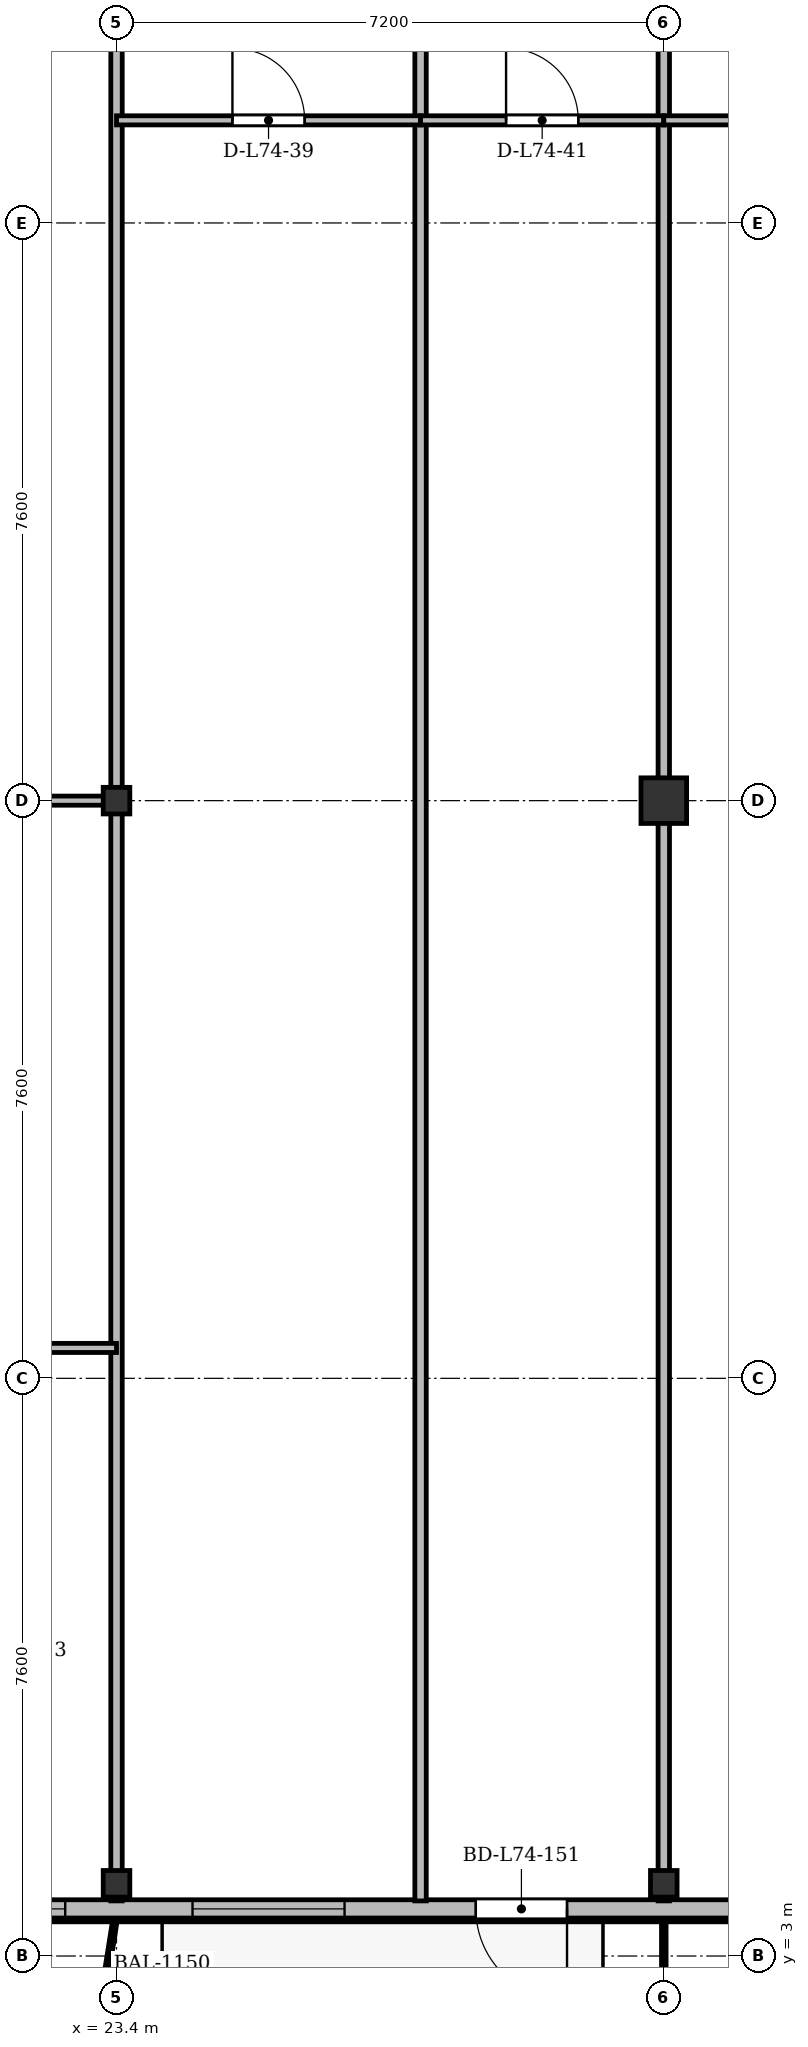
"""IFC4 building model, lengths in metres.
Left out: names, types, materials, properties, quantities, classifications, styles, units other than length and angle.
Written with IfcOpenShell. Run it as: python <this file> out.ifc"""

import sys

from ifc_helpers import new_model, si_unit, direction, frame, frame_2d, origin, origin_2d, place, context, subcontext, project, spatial, rectangle, i_section, extrude, source, transform, mapped, element, fill, save


model = new_model("IFC4")
c1 = context("Model", 3, precision=1e-05, world=origin(), true_north=direction((0.0, 1.0)))
c2 = subcontext(c1, "Body", "Model", "MODEL_VIEW")
j1 = project(units=[si_unit("LENGTHUNIT", "METRE"), si_unit("PLANEANGLEUNIT", "RADIAN")], contexts=[c1])
p1 = place(None, origin())
s1 = spatial("IfcSite", under=j1, at=p1, CompositionType="ELEMENT")
p2 = place(p1, origin())
s2 = spatial("IfcBuilding", under=s1, at=p2, CompositionType="ELEMENT")
p3 = place(p2, frame((0.0, 0.0, 284.7)))
s3 = spatial("IfcBuildingStorey", under=s2, at=p3, CompositionType="ELEMENT", Elevation=284.7)
m1 = source(origin(), c2, "Body", "SweptSolid", [
    extrude(i_section(OverallWidth=0.35, OverallDepth=0.35, WebThickness=0.018, FlangeThickness=0.028, at=origin_2d()), origin(), (0.0, 0.0, 1.0), 3.6),
])
for number, where, z_axis, x_axis in (
    (1, (23.4, 3.95, 0.0), (0.0, 0.0, 1.0), (1.0, 0.0, 0.0)),
    (2, (23.4, 18.2, 0.0), (0.0, 0.0, 1.0), (1.0, 0.0, 0.0)),
    (3, (30.6, 3.95, 0.0), (0.0, 0.0, 1.0), (1.0, 0.0, 0.0)),
):
    element("IfcColumn", number, at=place(p3, frame(where, z_axis=z_axis, x_axis=x_axis)), inside=s3, PredefinedType="COLUMN", context=c2, shape_type="MappedRepresentation", body=[
        mapped(m1, transform((0.0, 0.0, 0.0), x_axis=(1.0, 0.0, 0.0), y_axis=(0.0, 1.0, 0.0), z_axis=(0.0, 0.0, 1.0), scale=1.0)),
    ])
m2 = source(origin(), c2, "Body", "SweptSolid", [
    extrude(rectangle(XDim=0.6, YDim=0.6, at=origin_2d()), origin(), (0.0, 0.0, 1.0), 3.6),
])
p4 = place(p3, frame((30.6, 18.2, 0.0), z_axis=(0.0, 0.0, 1.0), x_axis=(1.0, 0.0, 0.0)))
e4 = element("IfcColumn", 4, at=p4, inside=s3, PredefinedType="COLUMN", context=c2, shape_type="MappedRepresentation", body=[
    mapped(m2, transform((0.0, 0.0, 0.0), x_axis=(1.0, 0.0, 0.0), y_axis=(0.0, 1.0, 0.0), z_axis=(0.0, 0.0, 1.0), scale=1.0)),
])
p5 = place(p3, frame((63.2, 3.62, 0.0), z_axis=(0.0, 0.0, 1.0), x_axis=(-1.0, 0.0, 0.0)))
e5 = element("IfcWall", 5, at=p5, inside=s3, PredefinedType="SOLIDWALL", context=c2, shape_type="SweptSolid", body=[
    extrude(rectangle(XDim=52.0, YDim=0.24, at=frame_2d((26.0, 0.0))), origin(), (0.0, 0.0, 1.0), 3.37),
])
p6 = place(p5, frame((0.92, 0.0, 0.9)))
e6 = element("IfcOpeningElement", 6, at=p6, cuts=e5, PredefinedType="OPENING", context=c2, shape_type="SweptSolid", body=[
    extrude(rectangle(XDim=1.65, YDim=1.85, at=frame_2d((0.825, 0.925))), frame((0.0, 0.13, 0.0), z_axis=(0.0, -1.0, 0.0), x_axis=(1.0, 0.0, 0.0)), (0.0, 0.0, 1.0), 0.26),
])
p7 = place(p5, frame((4.793, 0.0, 0.9)))
e7 = element("IfcOpeningElement", 7, at=p7, cuts=e5, PredefinedType="OPENING", context=c2, shape_type="SweptSolid", body=[
    extrude(rectangle(XDim=1.35, YDim=1.5, at=frame_2d((0.675, 0.75))), frame((0.0, 0.13, 0.0), z_axis=(0.0, -1.0, 0.0), x_axis=(1.0, 0.0, 0.0)), (0.0, 0.0, 1.0), 0.26),
])
p8 = place(p5, frame((6.685, 0.0, 0.0)))
e8 = element("IfcOpeningElement", 8, at=p8, cuts=e5, PredefinedType="OPENING", context=c2, shape_type="SweptSolid", body=[
    extrude(rectangle(XDim=1.2, YDim=2.2, at=frame_2d((0.6, 1.1))), frame((0.0, 0.13, 0.0), z_axis=(0.0, -1.0, 0.0), x_axis=(1.0, 0.0, 0.0)), (0.0, 0.0, 1.0), 0.26),
])
p9 = place(p5, frame((9.983, 0.0, 0.9)))
e9 = element("IfcOpeningElement", 9, at=p9, cuts=e5, PredefinedType="OPENING", context=c2, shape_type="SweptSolid", body=[
    extrude(rectangle(XDim=1.5, YDim=1.75, at=frame_2d((0.75, 0.875))), frame((0.0, 0.13, 0.0), z_axis=(0.0, -1.0, 0.0), x_axis=(1.0, 0.0, 0.0)), (0.0, 0.0, 1.0), 0.26),
])
p10 = place(p5, frame((13.2, 0.0, 0.9)))
e10 = element("IfcOpeningElement", 10, at=p10, cuts=e5, PredefinedType="OPENING", context=c2, shape_type="SweptSolid", body=[
    extrude(rectangle(XDim=2.0, YDim=1.95, at=frame_2d((1.0, 0.975))), frame((0.0, 0.13, 0.0), z_axis=(0.0, -1.0, 0.0), x_axis=(1.0, 0.0, 0.0)), (0.0, 0.0, 1.0), 0.26),
])
p11 = place(p5, frame((16.975, 0.0, 0.9)))
e11 = element("IfcOpeningElement", 11, at=p11, cuts=e5, PredefinedType="OPENING", context=c2, shape_type="SweptSolid", body=[
    extrude(rectangle(XDim=1.65, YDim=1.85, at=frame_2d((0.825, 0.925))), frame((0.0, 0.13, 0.0), z_axis=(0.0, -1.0, 0.0), x_axis=(1.0, 0.0, 0.0)), (0.0, 0.0, 1.0), 0.26),
])
p12 = place(p5, frame((21.3, 0.0, 0.9)))
e12 = element("IfcOpeningElement", 12, at=p12, cuts=e5, PredefinedType="OPENING", context=c2, shape_type="SweptSolid", body=[
    extrude(rectangle(XDim=1.8, YDim=1.8, at=frame_2d((0.9, 0.9))), frame((0.0, 0.13, 0.0), z_axis=(0.0, -1.0, 0.0), x_axis=(1.0, 0.0, 0.0)), (0.0, 0.0, 1.0), 0.26),
])
p13 = place(p5, frame((27.7, 0.0, 0.9)))
e13 = element("IfcOpeningElement", 13, at=p13, cuts=e5, PredefinedType="OPENING", context=c2, shape_type="SweptSolid", body=[
    extrude(rectangle(XDim=2.2, YDim=1.8, at=frame_2d((1.1, 0.9))), frame((0.0, 0.13, 0.0), z_axis=(0.0, -1.0, 0.0), x_axis=(1.0, 0.0, 0.0)), (0.0, 0.0, 1.0), 0.26),
])
p14 = place(p5, frame((33.873, 0.0, 0.0)))
e14 = element("IfcOpeningElement", 14, at=p14, cuts=e5, PredefinedType="OPENING", context=c2, shape_type="SweptSolid", body=[
    extrude(rectangle(XDim=1.2, YDim=2.2, at=frame_2d((0.6, 1.1))), frame((0.0, 0.13, 0.0), z_axis=(0.0, -1.0, 0.0), x_axis=(1.0, 0.0, 0.0)), (0.0, 0.0, 1.0), 0.26),
])
p15 = place(p5, frame((36.8, 0.0, 0.9)))
e15 = element("IfcOpeningElement", 15, at=p15, cuts=e5, PredefinedType="OPENING", context=c2, shape_type="SweptSolid", body=[
    extrude(rectangle(XDim=2.0, YDim=1.95, at=frame_2d((1.0, 0.975))), frame((0.0, 0.13, 0.0), z_axis=(0.0, -1.0, 0.0), x_axis=(1.0, 0.0, 0.0)), (0.0, 0.0, 1.0), 0.26),
])
p16 = place(p5, frame((40.475, 0.0, 0.9)))
e16 = element("IfcOpeningElement", 16, at=p16, cuts=e5, PredefinedType="OPENING", context=c2, shape_type="SweptSolid", body=[
    extrude(rectangle(XDim=1.65, YDim=1.85, at=frame_2d((0.825, 0.925))), frame((0.0, 0.13, 0.0), z_axis=(0.0, -1.0, 0.0), x_axis=(1.0, 0.0, 0.0)), (0.0, 0.0, 1.0), 0.26),
])
p17 = place(p5, frame((43.4, 0.0, 0.9)))
e17 = element("IfcOpeningElement", 17, at=p17, cuts=e5, PredefinedType="OPENING", context=c2, shape_type="SweptSolid", body=[
    extrude(rectangle(XDim=1.8, YDim=1.8, at=frame_2d((0.9, 0.9))), frame((0.0, 0.13, 0.0), z_axis=(0.0, -1.0, 0.0), x_axis=(1.0, 0.0, 0.0)), (0.0, 0.0, 1.0), 0.26),
])
p18 = place(p5, frame((45.99, 0.0, 0.9)))
e18 = element("IfcOpeningElement", 18, at=p18, cuts=e5, PredefinedType="OPENING", context=c2, shape_type="SweptSolid", body=[
    extrude(rectangle(XDim=1.2, YDim=1.65, at=frame_2d((0.6, 0.825))), frame((0.0, 0.13, 0.0), z_axis=(0.0, -1.0, 0.0), x_axis=(1.0, 0.0, 0.0)), (0.0, 0.0, 1.0), 0.26),
])
p19 = place(p5, frame((49.605, 0.0, 0.9)))
e19 = element("IfcOpeningElement", 19, at=p19, cuts=e5, PredefinedType="OPENING", context=c2, shape_type="SweptSolid", body=[
    extrude(rectangle(XDim=1.5, YDim=1.75, at=frame_2d((0.75, 0.875))), frame((0.0, 0.13, 0.0), z_axis=(0.0, -1.0, 0.0), x_axis=(1.0, 0.0, 0.0)), (0.0, 0.0, 1.0), 0.26),
])
p20 = place(p3, frame((23.4, 3.725, 0.0), z_axis=(0.0, 0.0, 1.0), x_axis=(0.0, 1.0, 0.0)))
e20 = element("IfcWall", 20, at=p20, inside=s3, PredefinedType="PARTITIONING", context=c2, shape_type="SweptSolid", body=[
    extrude(rectangle(XDim=27.275, YDim=0.15, at=frame_2d((13.637, 0.0))), origin(), (0.0, 0.0, 1.0), 2.87),
])
p21 = place(p3, frame((27.4, 3.725, 0.0), z_axis=(0.0, 0.0, 1.0), x_axis=(0.0, 1.0, 0.0)))
e21 = element("IfcWall", 21, at=p21, inside=s3, PredefinedType="PARTITIONING", context=c2, shape_type="SweptSolid", body=[
    extrude(rectangle(XDim=27.275, YDim=0.15, at=frame_2d((13.637, 0.0))), origin(), (0.0, 0.0, 1.0), 2.92),
])
p22 = place(p3, frame((30.6, 3.725, 0.0), z_axis=(0.0, 0.0, 1.0), x_axis=(0.0, 1.0, 0.0)))
e22 = element("IfcWall", 22, at=p22, inside=s3, PredefinedType="PARTITIONING", context=c2, shape_type="SweptSolid", body=[
    extrude(rectangle(XDim=27.275, YDim=0.15, at=frame_2d((13.637, 0.0))), origin(), (0.0, 0.0, 1.0), 2.87),
])
p23 = place(p3, frame((14.4, 18.2, 0.0), z_axis=(0.0, 0.0, 1.0), x_axis=(1.0, 0.0, 0.0)))
e23 = element("IfcWall", 23, at=p23, inside=s3, PredefinedType="PARTITIONING", context=c2, shape_type="SweptSolid", body=[
    extrude(rectangle(XDim=9.0, YDim=0.12, at=frame_2d((4.5, 0.0))), origin(), (0.0, 0.0, 1.0), 2.92),
])
p24 = place(p23, frame((4.025, 0.0, 0.0)))
e24 = element("IfcOpeningElement", 24, at=p24, cuts=e23, PredefinedType="OPENING", context=c2, shape_type="SweptSolid", body=[
    extrude(rectangle(XDim=0.95, YDim=2.15, at=frame_2d((0.475, 1.075))), frame((0.0, 0.07, 0.0), z_axis=(0.0, -1.0, 0.0), x_axis=(1.0, 0.0, 0.0)), (0.0, 0.0, 1.0), 0.14),
])
p25 = place(p3, frame((20.4, 11.0, 0.0), z_axis=(0.0, 0.0, 1.0), x_axis=(1.0, 0.0, 0.0)))
e25 = element("IfcWall", 25, at=p25, inside=s3, PredefinedType="PARTITIONING", context=c2, shape_type="SweptSolid", body=[
    extrude(rectangle(XDim=3.0, YDim=0.12, at=frame_2d((1.5, 0.0))), origin(), (0.0, 0.0, 1.0), 2.87),
])
p26 = place(p25, frame((1.025, 0.0, 0.0)))
e26 = element("IfcOpeningElement", 26, at=p26, cuts=e25, PredefinedType="OPENING", context=c2, shape_type="SweptSolid", body=[
    extrude(rectangle(XDim=0.95, YDim=2.15, at=frame_2d((0.475, 1.075))), frame((0.0, 0.07, 0.0), z_axis=(0.0, -1.0, 0.0), x_axis=(1.0, 0.0, 0.0)), (0.0, 0.0, 1.0), 0.14),
])
p27 = place(p3, frame((23.4, 27.15, 0.0), z_axis=(0.0, 0.0, 1.0), x_axis=(1.0, 0.0, 0.0)))
e27 = element("IfcWall", 27, at=p27, inside=s3, PredefinedType="PARTITIONING", context=c2, shape_type="SweptSolid", body=[
    extrude(rectangle(XDim=4.0, YDim=0.12, at=frame_2d((2.0, 0.0))), origin(), (0.0, 0.0, 1.0), 2.87),
])
p28 = place(p27, frame((1.525, 0.0, 0.0)))
e28 = element("IfcOpeningElement", 28, at=p28, cuts=e27, PredefinedType="OPENING", context=c2, shape_type="SweptSolid", body=[
    extrude(rectangle(XDim=0.95, YDim=2.15, at=frame_2d((0.475, 1.075))), frame((0.0, 0.07, 0.0), z_axis=(0.0, -1.0, 0.0), x_axis=(1.0, 0.0, 0.0)), (0.0, 0.0, 1.0), 0.14),
])
p29 = place(p3, frame((27.4, 27.15, 0.0), z_axis=(0.0, 0.0, 1.0), x_axis=(1.0, 0.0, 0.0)))
e29 = element("IfcWall", 29, at=p29, inside=s3, PredefinedType="PARTITIONING", context=c2, shape_type="SweptSolid", body=[
    extrude(rectangle(XDim=3.2, YDim=0.12, at=frame_2d((1.6, 0.0))), origin(), (0.0, 0.0, 1.0), 2.87),
])
p30 = place(p29, frame((1.125, 0.0, 0.0)))
e30 = element("IfcOpeningElement", 30, at=p30, cuts=e29, PredefinedType="OPENING", context=c2, shape_type="SweptSolid", body=[
    extrude(rectangle(XDim=0.95, YDim=2.15, at=frame_2d((0.475, 1.075))), frame((0.0, 0.07, 0.0), z_axis=(0.0, -1.0, 0.0), x_axis=(1.0, 0.0, 0.0)), (0.0, 0.0, 1.0), 0.14),
])
p31 = place(p3, frame((30.6, 27.15, 0.0), z_axis=(0.0, 0.0, 1.0), x_axis=(1.0, 0.0, 0.0)))
e31 = element("IfcWall", 31, at=p31, inside=s3, PredefinedType="PARTITIONING", context=c2, shape_type="SweptSolid", body=[
    extrude(rectangle(XDim=7.6, YDim=0.12, at=frame_2d((3.8, 0.0))), origin(), (0.0, 0.0, 1.0), 2.87),
])
p32 = place(p31, frame((3.325, 0.0, 0.0)))
e32 = element("IfcOpeningElement", 32, at=p32, cuts=e31, PredefinedType="OPENING", context=c2, shape_type="SweptSolid", body=[
    extrude(rectangle(XDim=0.95, YDim=2.15, at=frame_2d((0.475, 1.075))), frame((0.0, 0.07, 0.0), z_axis=(0.0, -1.0, 0.0), x_axis=(1.0, 0.0, 0.0)), (0.0, 0.0, 1.0), 0.14),
])
m3 = source(origin(), c2, "Body", "SweptSolid", [
    extrude(rectangle(XDim=1.2, YDim=2.2, at=frame_2d((0.6, 1.1))), frame((0.0, 0.025, 0.0), z_axis=(0.0, -1.0, 0.0), x_axis=(1.0, 0.0, 0.0)), (0.0, 0.0, 1.0), 0.05),
])
p33 = place(p14, origin())
e33 = element("IfcDoor", 33, at=p33, inside=s3, OperationType="SINGLE_SWING_LEFT", PredefinedType="DOOR", context=c2, shape_type="MappedRepresentation", body=[
    mapped(m3, transform((0.0, 0.0, 0.0), x_axis=(1.0, 0.0, 0.0), y_axis=(0.0, 1.0, 0.0), z_axis=(0.0, 0.0, 1.0), scale=1.0)),
])
fill(e14, e33)
m4 = source(origin(), c2, "Body", "SweptSolid", [
    extrude(rectangle(XDim=2.0, YDim=1.95, at=frame_2d((1.0, 0.975))), frame((0.0, 0.03, 0.0), z_axis=(0.0, -1.0, 0.0), x_axis=(1.0, 0.0, 0.0)), (0.0, 0.0, 1.0), 0.06),
])
p34 = place(p15, origin())
e34 = element("IfcWindow", 34, at=p34, inside=s3, PartitioningType="SINGLE_PANEL", PredefinedType="WINDOW", context=c2, shape_type="MappedRepresentation", body=[
    mapped(m4, transform((0.0, 0.0, 0.0), x_axis=(1.0, 0.0, 0.0), y_axis=(0.0, 1.0, 0.0), z_axis=(0.0, 0.0, 1.0), scale=1.0)),
])
fill(e15, e34)
m5 = source(origin(), c2, "Body", "SweptSolid", [
    extrude(rectangle(XDim=1.65, YDim=1.85, at=frame_2d((0.825, 0.925))), frame((0.0, 0.03, 0.0), z_axis=(0.0, -1.0, 0.0), x_axis=(1.0, 0.0, 0.0)), (0.0, 0.0, 1.0), 0.06),
])
p35 = place(p16, origin())
e35 = element("IfcWindow", 35, at=p35, inside=s3, PartitioningType="SINGLE_PANEL", PredefinedType="WINDOW", context=c2, shape_type="MappedRepresentation", body=[
    mapped(m5, transform((0.0, 0.0, 0.0), x_axis=(1.0, 0.0, 0.0), y_axis=(0.0, 1.0, 0.0), z_axis=(0.0, 0.0, 1.0), scale=1.0)),
])
fill(e16, e35)
m6 = source(origin(), c2, "Body", "SweptSolid", [
    extrude(rectangle(XDim=0.95, YDim=2.15, at=frame_2d((0.475, 1.075))), frame((0.0, 0.025, 0.0), z_axis=(0.0, -1.0, 0.0), x_axis=(1.0, 0.0, 0.0)), (0.0, 0.0, 1.0), 0.05),
])
p36 = place(p28, origin())
e36 = element("IfcDoor", 36, at=p36, inside=s3, OperationType="SINGLE_SWING_LEFT", PredefinedType="DOOR", context=c2, shape_type="MappedRepresentation", body=[
    mapped(m6, transform((0.0, 0.0, 0.0), x_axis=(1.0, 0.0, 0.0), y_axis=(0.0, 1.0, 0.0), z_axis=(0.0, 0.0, 1.0), scale=1.0)),
])
fill(e28, e36)
p37 = place(p30, origin())
e37 = element("IfcDoor", 37, at=p37, inside=s3, OperationType="SINGLE_SWING_LEFT", PredefinedType="DOOR", context=c2, shape_type="MappedRepresentation", body=[
    mapped(m6, transform((0.0, 0.0, 0.0), x_axis=(1.0, 0.0, 0.0), y_axis=(0.0, 1.0, 0.0), z_axis=(0.0, 0.0, 1.0), scale=1.0)),
])
fill(e30, e37)
save(model, sys.argv[1])
